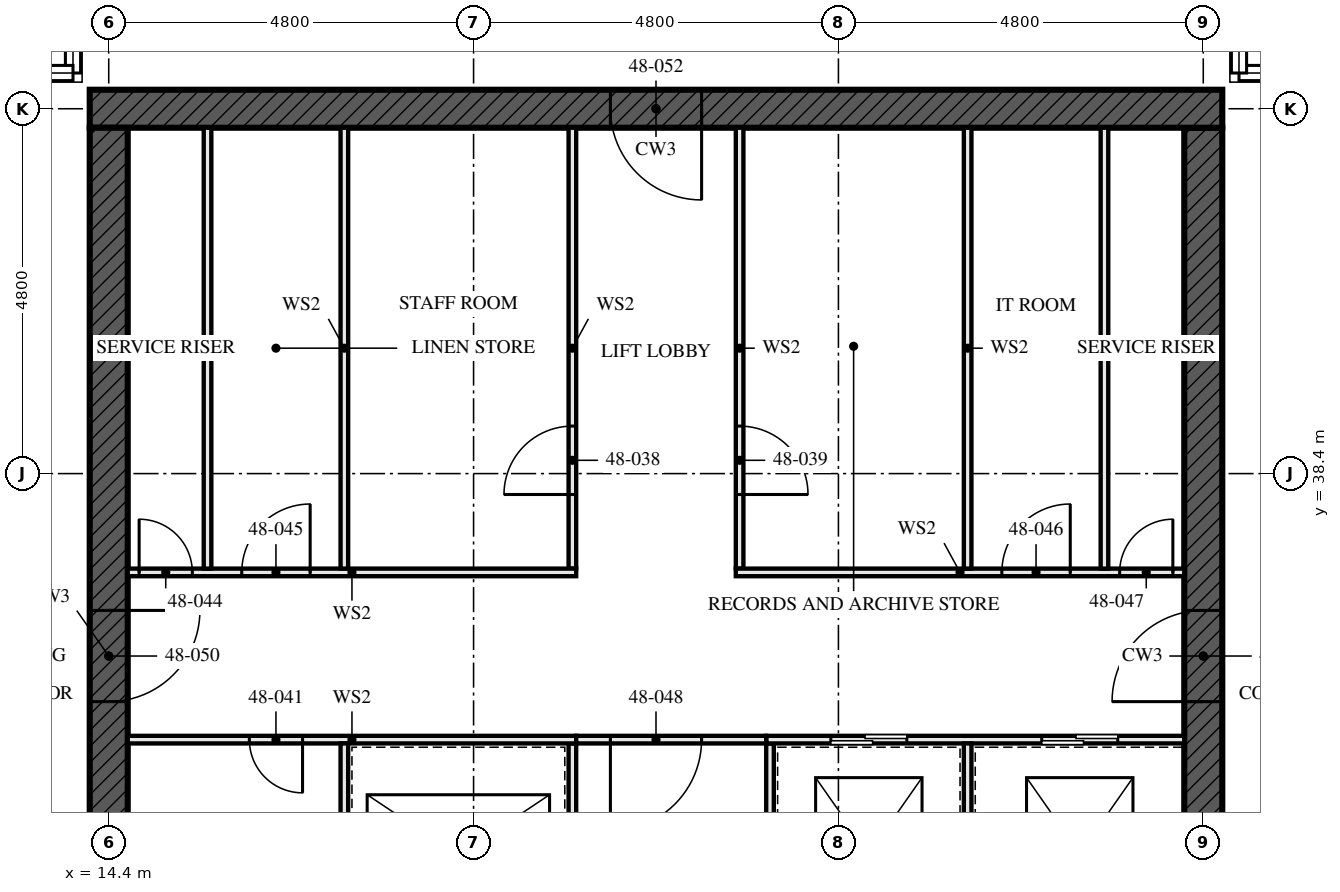
"""IFC4 building model, lengths in metres.
Left out: names, types, materials, properties, quantities, classifications, styles, units other than length and angle.
Written with IfcOpenShell. Run it as: python <this file> out.ifc"""

import sys

from ifc_helpers import new_model, si_unit, direction, frame, frame_2d, origin, place, context, subcontext, project, spatial, rectangle, extrude, element, fill, save


model = new_model("IFC4")
c1 = context("Model", 3, precision=1e-05, world=origin(), true_north=direction((0.0, 1.0)))
c2 = subcontext(c1, "Body", "Model", "MODEL_VIEW")
j1 = project(units=[si_unit("LENGTHUNIT", "METRE"), si_unit("PLANEANGLEUNIT", "RADIAN")], contexts=[c1])
p1 = place(None, origin())
s1 = spatial("IfcSite", under=j1, at=p1, CompositionType="ELEMENT")
p2 = place(p1, origin())
s2 = spatial("IfcBuilding", under=s1, at=p2, CompositionType="ELEMENT")
p3 = place(p2, frame((0.0, 0.0, 176.0)))
s3 = spatial("IfcBuildingStorey", under=s2, at=p3, CompositionType="ELEMENT", Elevation=176.0)
p4 = place(p3, frame((29.05, 43.2, -0.17), z_axis=(0.0, 0.0, 1.0), x_axis=(-1.0, 0.0, 0.0)))
e1 = element("IfcWall", 1, at=p4, inside=s3, PredefinedType="SHEAR", context=c2, shape_type="SweptSolid", body=[
    extrude(rectangle(XDim=14.9, YDim=0.5, at=frame_2d((7.45, 0.0))), origin(), (0.0, 0.0, 1.0), 3.5),
])
p5 = place(p4, frame((6.85, 0.0, 0.17)))
e2 = element("IfcOpeningElement", 2, at=p5, cuts=e1, PredefinedType="OPENING", context=c2, shape_type="SweptSolid", body=[
    extrude(rectangle(XDim=1.2, YDim=2.1, at=frame_2d((0.6, 1.05))), frame((0.0, 0.26, 0.0), z_axis=(0.0, -1.0, 0.0), x_axis=(1.0, 0.0, 0.0)), (0.0, 0.0, 1.0), 0.521),
])
p6 = place(p3, frame((14.4, 42.95, -0.17), z_axis=(0.0, 0.0, 1.0), x_axis=(0.0, -1.0, 0.0)))
e3 = element("IfcWall", 3, at=p6, inside=s3, PredefinedType="SHEAR", context=c2, shape_type="SweptSolid", body=[
    extrude(rectangle(XDim=13.9, YDim=0.5, at=frame_2d((6.95, 0.0))), origin(), (0.0, 0.0, 1.0), 3.5),
])
p7 = place(p6, frame((6.35, 0.0, 0.17)))
e4 = element("IfcOpeningElement", 4, at=p7, cuts=e3, PredefinedType="OPENING", context=c2, shape_type="SweptSolid", body=[
    extrude(rectangle(XDim=1.2, YDim=2.1, at=frame_2d((0.6, 1.05))), frame((0.0, 0.26, 0.0), z_axis=(0.0, -1.0, 0.0), x_axis=(1.0, 0.0, 0.0)), (0.0, 0.0, 1.0), 0.521),
])
p8 = place(p3, frame((28.8, 29.05, -0.17), z_axis=(0.0, 0.0, 1.0), x_axis=(0.0, 1.0, 0.0)))
e5 = element("IfcWall", 5, at=p8, inside=s3, PredefinedType="SHEAR", context=c2, shape_type="SweptSolid", body=[
    extrude(rectangle(XDim=13.9, YDim=0.5, at=frame_2d((6.95, 0.0))), origin(), (0.0, 0.0, 1.0), 3.5),
])
p9 = place(p8, frame((6.35, 0.0, 0.17)))
e6 = element("IfcOpeningElement", 6, at=p9, cuts=e5, PredefinedType="OPENING", context=c2, shape_type="SweptSolid", body=[
    extrude(rectangle(XDim=1.2, YDim=2.1, at=frame_2d((0.6, 1.05))), frame((0.0, 0.26, 0.0), z_axis=(0.0, -1.0, 0.0), x_axis=(1.0, 0.0, 0.0)), (0.0, 0.0, 1.0), 0.521),
])
for number, where, z_axis, x_axis in (
    (7, (15.7, 37.15, 0.0), (0.0, 0.0, 1.0), (0.0, 1.0, 0.0)),
    (8, (27.5, 37.15, 0.0), (0.0, 0.0, 1.0), (0.0, 1.0, 0.0)),
):
    element("IfcWall", number, at=place(p3, frame(where, z_axis=z_axis, x_axis=x_axis)), inside=s3, PredefinedType="SOLIDWALL", context=c2, shape_type="SweptSolid", body=[
        extrude(rectangle(XDim=5.8, YDim=0.1, at=frame_2d((2.9, 0.0))), origin(), (0.0, 0.0, 1.0), 3.33),
    ])
p10 = place(p3, frame((20.5, 29.05, 0.0), z_axis=(0.0, 0.0, 1.0), x_axis=(0.0, 1.0, 0.0)))
e9 = element("IfcWall", 9, at=p10, inside=s3, PredefinedType="SOLIDWALL", context=c2, shape_type="SweptSolid", body=[
    extrude(rectangle(XDim=5.8, YDim=0.1, at=frame_2d((2.9, 0.0))), origin(), (0.0, 0.0, 1.0), 3.33),
])
p11 = place(p10, frame((0.8, 0.0, 0.0)))
e10 = element("IfcOpeningElement", 10, at=p11, cuts=e9, PredefinedType="OPENING", context=c2, shape_type="SweptSolid", body=[
    extrude(rectangle(XDim=1.1, YDim=2.3, at=frame_2d((0.55, 1.15))), frame((0.0, 0.061, 0.0), z_axis=(0.0, -1.0, 0.0), x_axis=(1.0, 0.0, 0.0)), (0.0, 0.0, 1.0), 0.121),
])
p12 = place(p10, frame((3.775, 0.0, 0.0)))
e11 = element("IfcOpeningElement", 11, at=p12, cuts=e9, PredefinedType="OPENING", context=c2, shape_type="SweptSolid", body=[
    extrude(rectangle(XDim=1.1, YDim=2.3, at=frame_2d((0.55, 1.15))), frame((0.0, 0.061, 0.0), z_axis=(0.0, -1.0, 0.0), x_axis=(1.0, 0.0, 0.0)), (0.0, 0.0, 1.0), 0.121),
])
p13 = place(p3, frame((20.5, 37.15, 0.0), z_axis=(0.0, 0.0, 1.0), x_axis=(0.0, 1.0, 0.0)))
e12 = element("IfcWall", 12, at=p13, inside=s3, PredefinedType="SOLIDWALL", context=c2, shape_type="SweptSolid", body=[
    extrude(rectangle(XDim=5.8, YDim=0.1, at=frame_2d((2.9, 0.0))), origin(), (0.0, 0.0, 1.0), 3.33),
])
p14 = place(p13, frame((0.975, 0.0, 0.0)))
e13 = element("IfcOpeningElement", 13, at=p14, cuts=e12, PredefinedType="OPENING", context=c2, shape_type="SweptSolid", body=[
    extrude(rectangle(XDim=0.9, YDim=2.1, at=frame_2d((0.45, 1.05))), frame((0.0, 0.061, 0.0), z_axis=(0.0, -1.0, 0.0), x_axis=(1.0, 0.0, 0.0)), (0.0, 0.0, 1.0), 0.121),
])
p15 = place(p3, frame((22.7, 37.15, 0.0), z_axis=(0.0, 0.0, 1.0), x_axis=(0.0, 1.0, 0.0)))
e14 = element("IfcWall", 14, at=p15, inside=s3, PredefinedType="SOLIDWALL", context=c2, shape_type="SweptSolid", body=[
    extrude(rectangle(XDim=5.8, YDim=0.1, at=frame_2d((2.9, 0.0))), origin(), (0.0, 0.0, 1.0), 3.33),
])
p16 = place(p15, frame((0.975, 0.0, 0.0)))
e15 = element("IfcOpeningElement", 15, at=p16, cuts=e14, PredefinedType="OPENING", context=c2, shape_type="SweptSolid", body=[
    extrude(rectangle(XDim=0.9, YDim=2.1, at=frame_2d((0.45, 1.05))), frame((0.0, 0.061, 0.0), z_axis=(0.0, -1.0, 0.0), x_axis=(1.0, 0.0, 0.0)), (0.0, 0.0, 1.0), 0.121),
])
p17 = place(p3, frame((23.1, 29.05, 0.0), z_axis=(0.0, 0.0, 1.0), x_axis=(0.0, 1.0, 0.0)))
e16 = element("IfcWall", 16, at=p17, inside=s3, PredefinedType="SOLIDWALL", context=c2, shape_type="SweptSolid", body=[
    extrude(rectangle(XDim=5.8, YDim=0.1, at=frame_2d((2.9, 0.0))), origin(), (0.0, 0.0, 1.0), 3.33),
])
p18 = place(p17, frame((1.0, 0.0, 0.0)))
e17 = element("IfcOpeningElement", 17, at=p18, cuts=e16, PredefinedType="OPENING", context=c2, shape_type="SweptSolid", body=[
    extrude(rectangle(XDim=0.7, YDim=2.1, at=frame_2d((0.35, 1.05))), frame((0.0, 0.061, 0.0), z_axis=(0.0, -1.0, 0.0), x_axis=(1.0, 0.0, 0.0)), (0.0, 0.0, 1.0), 0.121),
])
p19 = place(p3, frame((14.65, 34.9, 0.0), z_axis=(0.0, 0.0, 1.0), x_axis=(1.0, 0.0, 0.0)))
e18 = element("IfcWall", 18, at=p19, inside=s3, PredefinedType="SOLIDWALL", context=c2, shape_type="SweptSolid", body=[
    extrude(rectangle(XDim=5.9, YDim=0.1, at=frame_2d((2.95, 0.0))), origin(), (0.0, 0.0, 1.0), 3.33),
])
p20 = place(p19, frame((1.6, 0.0, 0.0)))
e19 = element("IfcOpeningElement", 19, at=p20, cuts=e18, PredefinedType="OPENING", context=c2, shape_type="SweptSolid", body=[
    extrude(rectangle(XDim=0.7, YDim=2.1, at=frame_2d((0.35, 1.05))), frame((0.0, 0.061, 0.0), z_axis=(0.0, -1.0, 0.0), x_axis=(1.0, 0.0, 0.0)), (0.0, 0.0, 1.0), 0.121),
])
p21 = place(p3, frame((23.05, 34.9, 0.0), z_axis=(0.0, 0.0, 1.0), x_axis=(1.0, 0.0, 0.0)))
e20 = element("IfcWall", 20, at=p21, inside=s3, PredefinedType="SOLIDWALL", context=c2, shape_type="SweptSolid", body=[
    extrude(rectangle(XDim=5.5, YDim=0.1, at=frame_2d((2.75, 0.0))), origin(), (0.0, 0.0, 1.0), 3.33),
])
p22 = place(p21, frame((0.85, 0.0, 0.0)))
e21 = element("IfcOpeningElement", 21, at=p22, cuts=e20, PredefinedType="OPENING", context=c2, shape_type="SweptSolid", body=[
    extrude(rectangle(XDim=1.0, YDim=2.1, at=frame_2d((0.5, 1.05))), frame((0.0, 0.061, 0.0), z_axis=(0.0, -1.0, 0.0), x_axis=(1.0, 0.0, 0.0)), (0.0, 0.0, 1.0), 0.121),
])
p23 = place(p21, frame((3.625, 0.0, 0.0)))
e22 = element("IfcOpeningElement", 22, at=p23, cuts=e20, PredefinedType="OPENING", context=c2, shape_type="SweptSolid", body=[
    extrude(rectangle(XDim=1.0, YDim=2.1, at=frame_2d((0.5, 1.05))), frame((0.0, 0.061, 0.0), z_axis=(0.0, -1.0, 0.0), x_axis=(1.0, 0.0, 0.0)), (0.0, 0.0, 1.0), 0.121),
])
p24 = place(p3, frame((14.65, 37.1, 0.0), z_axis=(0.0, 0.0, 1.0), x_axis=(1.0, 0.0, 0.0)))
e23 = element("IfcWall", 23, at=p24, inside=s3, PredefinedType="SOLIDWALL", context=c2, shape_type="SweptSolid", body=[
    extrude(rectangle(XDim=5.9, YDim=0.1, at=frame_2d((2.95, 0.0))), origin(), (0.0, 0.0, 1.0), 3.33),
])
p25 = place(p24, frame((0.15, 0.0, 0.0)))
e24 = element("IfcOpeningElement", 24, at=p25, cuts=e23, PredefinedType="OPENING", context=c2, shape_type="SweptSolid", body=[
    extrude(rectangle(XDim=0.7, YDim=2.1, at=frame_2d((0.35, 1.05))), frame((0.0, 0.061, 0.0), z_axis=(0.0, -1.0, 0.0), x_axis=(1.0, 0.0, 0.0)), (0.0, 0.0, 1.0), 0.121),
])
p26 = place(p24, frame((1.5, 0.0, 0.0)))
e25 = element("IfcOpeningElement", 25, at=p26, cuts=e23, PredefinedType="OPENING", context=c2, shape_type="SweptSolid", body=[
    extrude(rectangle(XDim=0.9, YDim=2.1, at=frame_2d((0.45, 1.05))), frame((0.0, 0.061, 0.0), z_axis=(0.0, -1.0, 0.0), x_axis=(1.0, 0.0, 0.0)), (0.0, 0.0, 1.0), 0.121),
])
p27 = place(p3, frame((22.65, 37.1, 0.0), z_axis=(0.0, 0.0, 1.0), x_axis=(1.0, 0.0, 0.0)))
e26 = element("IfcWall", 26, at=p27, inside=s3, PredefinedType="SOLIDWALL", context=c2, shape_type="SweptSolid", body=[
    extrude(rectangle(XDim=5.9, YDim=0.1, at=frame_2d((2.95, 0.0))), origin(), (0.0, 0.0, 1.0), 3.33),
])
p28 = place(p27, frame((3.5, 0.0, 0.0)))
e27 = element("IfcOpeningElement", 27, at=p28, cuts=e26, PredefinedType="OPENING", context=c2, shape_type="SweptSolid", body=[
    extrude(rectangle(XDim=0.9, YDim=2.1, at=frame_2d((0.45, 1.05))), frame((0.0, 0.061, 0.0), z_axis=(0.0, -1.0, 0.0), x_axis=(1.0, 0.0, 0.0)), (0.0, 0.0, 1.0), 0.121),
])
p29 = place(p27, frame((5.05, 0.0, 0.0)))
e28 = element("IfcOpeningElement", 28, at=p29, cuts=e26, PredefinedType="OPENING", context=c2, shape_type="SweptSolid", body=[
    extrude(rectangle(XDim=0.7, YDim=2.1, at=frame_2d((0.35, 1.05))), frame((0.0, 0.061, 0.0), z_axis=(0.0, -1.0, 0.0), x_axis=(1.0, 0.0, 0.0)), (0.0, 0.0, 1.0), 0.121),
])
p30 = place(p3, frame((20.55, 34.9, 0.0), z_axis=(0.0, 0.0, 1.0), x_axis=(1.0, 0.0, 0.0)))
e29 = element("IfcWall", 29, at=p30, inside=s3, PredefinedType="SOLIDWALL", context=c2, shape_type="SweptSolid", body=[
    extrude(rectangle(XDim=2.5, YDim=0.1, at=frame_2d((1.25, 0.0))), origin(), (0.0, 0.0, 1.0), 3.33),
])
p31 = place(p30, frame((0.45, 0.0, 0.0)))
e30 = element("IfcOpeningElement", 30, at=p31, cuts=e29, PredefinedType="OPENING", context=c2, shape_type="SweptSolid", body=[
    extrude(rectangle(XDim=1.2, YDim=2.1, at=frame_2d((0.6, 1.05))), frame((0.0, 0.061, 0.0), z_axis=(0.0, -1.0, 0.0), x_axis=(1.0, 0.0, 0.0)), (0.0, 0.0, 1.0), 0.121),
])
for number, where, z_axis, x_axis in (
    (31, (17.5, 29.05, 0.0), (0.0, 0.0, 1.0), (0.0, 1.0, 0.0)),
    (32, (17.5, 37.15, 0.0), (0.0, 0.0, 1.0), (0.0, 1.0, 0.0)),
    (33, (25.7, 37.15, 0.0), (0.0, 0.0, 1.0), (0.0, 1.0, 0.0)),
):
    element("IfcWall", number, at=place(p3, frame(where, z_axis=z_axis, x_axis=x_axis)), inside=s3, PredefinedType="SOLIDWALL", context=c2, shape_type="SweptSolid", body=[
        extrude(rectangle(XDim=5.8, YDim=0.1, at=frame_2d((2.9, 0.0))), origin(), (0.0, 0.0, 1.0), 3.33),
    ])
p32 = place(p3, frame((25.7, 31.95, 0.0), z_axis=(0.0, 0.0, 1.0), x_axis=(0.0, 1.0, 0.0)))
e34 = element("IfcWall", 34, at=p32, inside=s3, PredefinedType="SOLIDWALL", context=c2, shape_type="SweptSolid", body=[
    extrude(rectangle(XDim=2.9, YDim=0.1, at=frame_2d((1.45, 0.0))), origin(), (0.0, 0.0, 1.0), 3.33),
])
p33 = place(p14, origin())
e35 = element("IfcDoor", 35, at=p33, inside=s3, OperationType="SINGLE_SWING_RIGHT", PredefinedType="DOOR", context=c2, shape_type="SweptSolid", body=[
    extrude(rectangle(XDim=0.9, YDim=2.1, at=frame_2d((0.45, 1.05))), frame((0.0, 0.027, 0.0), z_axis=(0.0, -1.0, 0.0), x_axis=(1.0, 0.0, 0.0)), (0.0, 0.0, 1.0), 0.054),
])
fill(e13, e35)
p34 = place(p16, frame((0.9, 0.0, 0.0), z_axis=(0.0, 0.0, 1.0), x_axis=(-1.0, 0.0, 0.0)))
e36 = element("IfcDoor", 36, at=p34, inside=s3, OperationType="SINGLE_SWING_LEFT", PredefinedType="DOOR", context=c2, shape_type="SweptSolid", body=[
    extrude(rectangle(XDim=0.9, YDim=2.1, at=frame_2d((0.45, 1.05))), frame((0.0, 0.027, 0.0), z_axis=(0.0, -1.0, 0.0), x_axis=(1.0, 0.0, 0.0)), (0.0, 0.0, 1.0), 0.054),
])
fill(e15, e36)
p35 = place(p20, frame((0.7, 0.0, 0.0), z_axis=(0.0, 0.0, 1.0), x_axis=(-1.0, 0.0, 0.0)))
e37 = element("IfcDoor", 37, at=p35, inside=s3, OperationType="SINGLE_SWING_RIGHT", PredefinedType="DOOR", context=c2, shape_type="SweptSolid", body=[
    extrude(rectangle(XDim=0.7, YDim=2.1, at=frame_2d((0.35, 1.05))), frame((0.0, 0.027, 0.0), z_axis=(0.0, -1.0, 0.0), x_axis=(1.0, 0.0, 0.0)), (0.0, 0.0, 1.0), 0.054),
])
fill(e19, e37)
p36 = place(p22, origin())
e38 = element("IfcDoor", 38, at=p36, inside=s3, OperationType="SLIDING_TO_LEFT", PredefinedType="DOOR", context=c2, shape_type="SweptSolid", body=[
    extrude(rectangle(XDim=1.0, YDim=2.1, at=frame_2d((0.5, 1.05))), frame((0.0, 0.05, 0.0), z_axis=(0.0, -1.0, 0.0), x_axis=(1.0, 0.0, 0.0)), (0.0, 0.0, 1.0), 0.1),
])
fill(e21, e38)
p37 = place(p23, origin())
e39 = element("IfcDoor", 39, at=p37, inside=s3, OperationType="SLIDING_TO_LEFT", PredefinedType="DOOR", context=c2, shape_type="SweptSolid", body=[
    extrude(rectangle(XDim=1.0, YDim=2.1, at=frame_2d((0.5, 1.05))), frame((0.0, 0.05, 0.0), z_axis=(0.0, -1.0, 0.0), x_axis=(1.0, 0.0, 0.0)), (0.0, 0.0, 1.0), 0.1),
])
fill(e22, e39)
p38 = place(p25, origin())
e40 = element("IfcDoor", 40, at=p38, inside=s3, OperationType="SINGLE_SWING_RIGHT", PredefinedType="DOOR", context=c2, shape_type="SweptSolid", body=[
    extrude(rectangle(XDim=0.7, YDim=2.1, at=frame_2d((0.35, 1.05))), frame((0.0, 0.027, 0.0), z_axis=(0.0, -1.0, 0.0), x_axis=(1.0, 0.0, 0.0)), (0.0, 0.0, 1.0), 0.054),
])
fill(e24, e40)
p39 = place(p26, origin())
e41 = element("IfcDoor", 41, at=p39, inside=s3, OperationType="SINGLE_SWING_LEFT", PredefinedType="DOOR", context=c2, shape_type="SweptSolid", body=[
    extrude(rectangle(XDim=0.9, YDim=2.1, at=frame_2d((0.45, 1.05))), frame((0.0, 0.027, 0.0), z_axis=(0.0, -1.0, 0.0), x_axis=(1.0, 0.0, 0.0)), (0.0, 0.0, 1.0), 0.054),
])
fill(e25, e41)
p40 = place(p28, origin())
e42 = element("IfcDoor", 42, at=p40, inside=s3, OperationType="SINGLE_SWING_LEFT", PredefinedType="DOOR", context=c2, shape_type="SweptSolid", body=[
    extrude(rectangle(XDim=0.9, YDim=2.1, at=frame_2d((0.45, 1.05))), frame((0.0, 0.027, 0.0), z_axis=(0.0, -1.0, 0.0), x_axis=(1.0, 0.0, 0.0)), (0.0, 0.0, 1.0), 0.054),
])
fill(e27, e42)
p41 = place(p29, origin())
e43 = element("IfcDoor", 43, at=p41, inside=s3, OperationType="SINGLE_SWING_LEFT", PredefinedType="DOOR", context=c2, shape_type="SweptSolid", body=[
    extrude(rectangle(XDim=0.7, YDim=2.1, at=frame_2d((0.35, 1.05))), frame((0.0, 0.027, 0.0), z_axis=(0.0, -1.0, 0.0), x_axis=(1.0, 0.0, 0.0)), (0.0, 0.0, 1.0), 0.054),
])
fill(e28, e43)
p42 = place(p31, frame((1.2, 0.0, 0.0), z_axis=(0.0, 0.0, 1.0), x_axis=(-1.0, 0.0, 0.0)))
e44 = element("IfcDoor", 44, at=p42, inside=s3, OperationType="SINGLE_SWING_LEFT", PredefinedType="DOOR", context=c2, shape_type="SweptSolid", body=[
    extrude(rectangle(XDim=1.2, YDim=2.1, at=frame_2d((0.6, 1.05))), frame((0.0, 0.027, 0.0), z_axis=(0.0, -1.0, 0.0), x_axis=(1.0, 0.0, 0.0)), (0.0, 0.0, 1.0), 0.054),
])
fill(e30, e44)
p43 = place(p7, origin())
e45 = element("IfcDoor", 45, at=p43, inside=s3, OperationType="SINGLE_SWING_LEFT", PredefinedType="DOOR", context=c2, shape_type="SweptSolid", body=[
    extrude(rectangle(XDim=1.2, YDim=2.1, at=frame_2d((0.6, 1.05))), frame((0.0, 0.027, 0.0), z_axis=(0.0, -1.0, 0.0), x_axis=(1.0, 0.0, 0.0)), (0.0, 0.0, 1.0), 0.054),
])
fill(e4, e45)
p44 = place(p9, origin())
e46 = element("IfcDoor", 46, at=p44, inside=s3, OperationType="SINGLE_SWING_LEFT", PredefinedType="DOOR", context=c2, shape_type="SweptSolid", body=[
    extrude(rectangle(XDim=1.2, YDim=2.1, at=frame_2d((0.6, 1.05))), frame((0.0, 0.027, 0.0), z_axis=(0.0, -1.0, 0.0), x_axis=(1.0, 0.0, 0.0)), (0.0, 0.0, 1.0), 0.054),
])
fill(e6, e46)
p45 = place(p5, origin())
e47 = element("IfcDoor", 47, at=p45, inside=s3, OperationType="SINGLE_SWING_LEFT", PredefinedType="DOOR", context=c2, shape_type="SweptSolid", body=[
    extrude(rectangle(XDim=1.2, YDim=2.1, at=frame_2d((0.6, 1.05))), frame((0.0, 0.027, 0.0), z_axis=(0.0, -1.0, 0.0), x_axis=(1.0, 0.0, 0.0)), (0.0, 0.0, 1.0), 0.054),
])
fill(e2, e47)
save(model, sys.argv[1])
